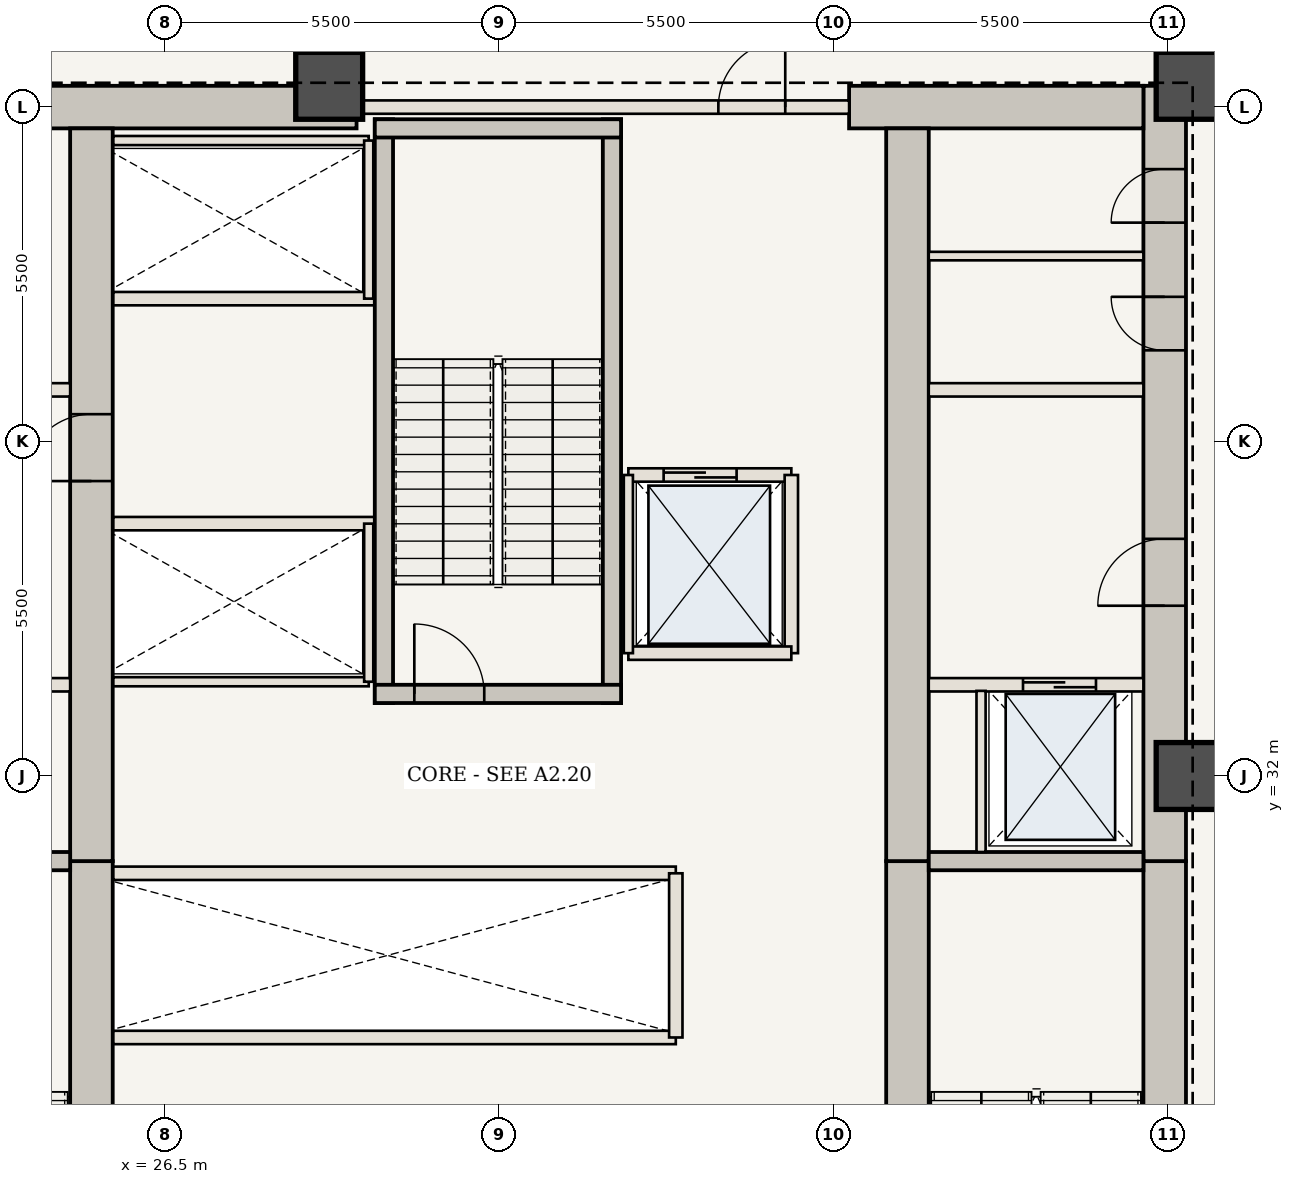
"""IFC4 building model, lengths in metres.
Left out: names, types, materials, properties, quantities, classifications, styles, units other than length and angle.
Written with IfcOpenShell. Run it as: python <this file> out.ifc"""

import sys

from ifc_helpers import new_model, si_unit, direction, frame, frame_2d, origin, origin_2d, place, context, subcontext, project, spatial, rectangle, extrude, element, fill, save


model = new_model("IFC4")
c1 = context("Model", 3, precision=1e-05, world=origin(), true_north=direction((0.0, 1.0)))
c2 = subcontext(c1, "Body", "Model", "MODEL_VIEW")
j1 = project(units=[si_unit("LENGTHUNIT", "METRE"), si_unit("PLANEANGLEUNIT", "RADIAN")], contexts=[c1])
p1 = place(None, origin())
s1 = spatial("IfcSite", under=j1, at=p1, CompositionType="ELEMENT")
p2 = place(p1, origin())
s2 = spatial("IfcBuilding", under=s1, at=p2, CompositionType="ELEMENT")
p3 = place(p2, frame((0.0, 0.0, 77.35)))
s3 = spatial("IfcBuildingStorey", under=s2, at=p3, CompositionType="ELEMENT", Elevation=77.35)
p4 = place(p3, frame((42.94, 20.6, 0.0), z_axis=(0.0, 0.0, 1.0), x_axis=(0.0, 1.0, 0.0)))
e1 = element("IfcWall", 1, at=p4, inside=s3, PredefinedType="SHEAR", context=c2, shape_type="SweptSolid", body=[
    extrude(rectangle(XDim=10.0, YDim=0.7, at=frame_2d((5.0, 0.0))), origin(), (0.0, 0.0, 1.0), 4.9),
])
p5 = place(p4, frame((1.15, 0.0, 0.0)))
e2 = element("IfcOpeningElement", 2, at=p5, cuts=e1, PredefinedType="OPENING", context=c2, shape_type="SweptSolid", body=[
    extrude(rectangle(XDim=1.15, YDim=2.15, at=frame_2d((0.575, 1.075))), frame((0.0, 0.36, 0.0), z_axis=(0.0, -1.0, 0.0), x_axis=(1.0, 0.0, 0.0)), (0.0, 0.0, 1.0), 0.72),
])
p6 = place(p3, frame((42.94, 30.6, 0.0), z_axis=(0.0, 0.0, 1.0), x_axis=(0.0, 1.0, 0.0)))
e3 = element("IfcWall", 3, at=p6, inside=s3, PredefinedType="SHEAR", context=c2, shape_type="SweptSolid", body=[
    extrude(rectangle(XDim=12.75, YDim=0.7, at=frame_2d((6.375, 0.0))), origin(), (0.0, 0.0, 1.0), 4.9),
])
p7 = place(p6, frame((4.2, 0.0, 0.0)))
e4 = element("IfcOpeningElement", 4, at=p7, cuts=e3, PredefinedType="OPENING", context=c2, shape_type="SweptSolid", body=[
    extrude(rectangle(XDim=1.1, YDim=2.15, at=frame_2d((0.55, 1.075))), frame((0.0, 0.36, 0.0), z_axis=(0.0, -1.0, 0.0), x_axis=(1.0, 0.0, 0.0)), (0.0, 0.0, 1.0), 0.72),
])
p8 = place(p6, frame((8.4, 0.0, 0.0)))
e5 = element("IfcOpeningElement", 5, at=p8, cuts=e3, PredefinedType="OPENING", context=c2, shape_type="SweptSolid", body=[
    extrude(rectangle(XDim=0.88, YDim=2.1, at=frame_2d((0.44, 1.05))), frame((0.0, 0.36, 0.0), z_axis=(0.0, -1.0, 0.0), x_axis=(1.0, 0.0, 0.0)), (0.0, 0.0, 1.0), 0.72),
])
p9 = place(p6, frame((10.5, 0.0, 0.0)))
e6 = element("IfcOpeningElement", 6, at=p9, cuts=e3, PredefinedType="OPENING", context=c2, shape_type="SweptSolid", body=[
    extrude(rectangle(XDim=0.88, YDim=2.1, at=frame_2d((0.44, 1.05))), frame((0.0, 0.36, 0.0), z_axis=(0.0, -1.0, 0.0), x_axis=(1.0, 0.0, 0.0)), (0.0, 0.0, 1.0), 0.72),
])
p10 = place(p3, frame((21.41, 43.0, 0.0), z_axis=(0.0, 0.0, 1.0), x_axis=(1.0, 0.0, 0.0)))
e7 = element("IfcWall", 7, at=p10, inside=s3, PredefinedType="SHEAR", context=c2, shape_type="SweptSolid", body=[
    extrude(rectangle(XDim=8.24, YDim=0.7, at=frame_2d((4.12, 0.0))), origin(), (0.0, 0.0, 1.0), 4.9),
])
p11 = place(p3, frame((37.75, 43.0, 0.0), z_axis=(0.0, 0.0, 1.0), x_axis=(1.0, 0.0, 0.0)))
e8 = element("IfcWall", 8, at=p11, inside=s3, PredefinedType="SHEAR", context=c2, shape_type="SweptSolid", body=[
    extrude(rectangle(XDim=4.84, YDim=0.7, at=frame_2d((2.42, 0.0))), origin(), (0.0, 0.0, 1.0), 4.9),
])
p12 = place(p3, frame((25.29, 21.3, 0.0), z_axis=(0.0, 0.0, 1.0), x_axis=(0.0, 1.0, 0.0)))
e9 = element("IfcWall", 9, at=p12, inside=s3, PredefinedType="SHEAR", context=c2, shape_type="SweptSolid", body=[
    extrude(rectangle(XDim=9.3, YDim=0.7, at=frame_2d((4.65, 0.0))), origin(), (0.0, 0.0, 1.0), 4.9),
])
p13 = place(p3, frame((25.29, 30.6, 0.0), z_axis=(0.0, 0.0, 1.0), x_axis=(0.0, 1.0, 0.0)))
e10 = element("IfcWall", 10, at=p13, inside=s3, PredefinedType="SHEAR", context=c2, shape_type="SweptSolid", body=[
    extrude(rectangle(XDim=12.05, YDim=0.7, at=frame_2d((6.025, 0.0))), origin(), (0.0, 0.0, 1.0), 4.9),
])
p14 = place(p13, frame((6.25, 0.0, 0.0)))
e11 = element("IfcOpeningElement", 11, at=p14, cuts=e10, PredefinedType="OPENING", context=c2, shape_type="SweptSolid", body=[
    extrude(rectangle(XDim=1.1, YDim=2.15, at=frame_2d((0.55, 1.075))), frame((0.0, 0.36, 0.0), z_axis=(0.0, -1.0, 0.0), x_axis=(1.0, 0.0, 0.0)), (0.0, 0.0, 1.0), 0.72),
])
p15 = place(p3, frame((38.71, 21.3, 0.0), z_axis=(0.0, 0.0, 1.0), x_axis=(0.0, 1.0, 0.0)))
e12 = element("IfcWall", 12, at=p15, inside=s3, PredefinedType="SHEAR", context=c2, shape_type="SweptSolid", body=[
    extrude(rectangle(XDim=9.3, YDim=0.7, at=frame_2d((4.65, 0.0))), origin(), (0.0, 0.0, 1.0), 4.9),
])
p16 = place(p3, frame((38.71, 30.6, 0.0), z_axis=(0.0, 0.0, 1.0), x_axis=(0.0, 1.0, 0.0)))
e13 = element("IfcWall", 13, at=p16, inside=s3, PredefinedType="SHEAR", context=c2, shape_type="SweptSolid", body=[
    extrude(rectangle(XDim=12.05, YDim=0.7, at=frame_2d((6.025, 0.0))), origin(), (0.0, 0.0, 1.0), 4.9),
])
for number, where, z_axis, x_axis in (
    (14, (43.35, 32.0, 0.0), (0.0, 0.0, 1.0), (1.0, 0.0, 0.0)),
    (15, (43.35, 43.35, 0.0), (0.0, 0.0, 1.0), (1.0, 0.0, 0.0)),
    (16, (29.2, 43.35, 0.0), (0.0, 0.0, 1.0), (1.0, 0.0, 0.0)),
):
    element("IfcColumn", number, at=place(p3, frame(where, z_axis=z_axis, x_axis=x_axis)), inside=s3, PredefinedType="COLUMN", context=c2, shape_type="SweptSolid", body=[
        extrude(rectangle(XDim=1.1, YDim=1.1, at=origin_2d()), origin(), (0.0, 0.0, 1.0), 4.9),
    ])
for number, where, z_axis, x_axis in (
    (17, (21.41, 30.6, 0.0), (0.0, 0.0, 1.0), (1.0, 0.0, 0.0)),
    (18, (39.06, 30.6, 0.0), (0.0, 0.0, 1.0), (1.0, 0.0, 0.0)),
):
    element("IfcWall", number, at=place(p3, frame(where, z_axis=z_axis, x_axis=x_axis)), inside=s3, PredefinedType="SHEAR", context=c2, shape_type="SweptSolid", body=[
        extrude(rectangle(XDim=3.53, YDim=0.3, at=frame_2d((1.765, 0.0))), origin(), (0.0, 0.0, 1.0), 4.72),
    ])
p17 = place(p3, frame((21.41, 33.5, 0.0), z_axis=(0.0, 0.0, 1.0), x_axis=(1.0, 0.0, 0.0)))
e19 = element("IfcWall", 19, at=p17, inside=s3, PredefinedType="STANDARD", context=c2, shape_type="SweptSolid", body=[
    extrude(rectangle(XDim=3.53, YDim=0.22, at=frame_2d((1.765, 0.0))), origin(), (0.0, 0.0, 1.0), 4.72),
])
p18 = place(p17, frame((0.75, 0.0, 0.0)))
e20 = element("IfcOpeningElement", 20, at=p18, cuts=e19, PredefinedType="OPENING", context=c2, shape_type="SweptSolid", body=[
    extrude(rectangle(XDim=1.2, YDim=2.2, at=frame_2d((0.6, 1.1))), frame((0.0, 0.12, 0.0), z_axis=(0.0, -1.0, 0.0), x_axis=(1.0, 0.0, 0.0)), (0.0, 0.0, 1.0), 0.24),
])
p19 = place(p3, frame((39.06, 33.5, 0.0), z_axis=(0.0, 0.0, 1.0), x_axis=(1.0, 0.0, 0.0)))
e21 = element("IfcWall", 21, at=p19, inside=s3, PredefinedType="STANDARD", context=c2, shape_type="SweptSolid", body=[
    extrude(rectangle(XDim=3.53, YDim=0.22, at=frame_2d((1.765, 0.0))), origin(), (0.0, 0.0, 1.0), 4.72),
])
p20 = place(p19, frame((1.55, 0.0, 0.0)))
e22 = element("IfcOpeningElement", 22, at=p20, cuts=e21, PredefinedType="OPENING", context=c2, shape_type="SweptSolid", body=[
    extrude(rectangle(XDim=1.2, YDim=2.2, at=frame_2d((0.6, 1.1))), frame((0.0, 0.12, 0.0), z_axis=(0.0, -1.0, 0.0), x_axis=(1.0, 0.0, 0.0)), (0.0, 0.0, 1.0), 0.24),
])
p21 = place(p3, frame((39.92, 30.75, 0.0), z_axis=(0.0, 0.0, 1.0), x_axis=(0.0, 1.0, 0.0)))
e23 = element("IfcWall", 23, at=p21, inside=s3, PredefinedType="STANDARD", context=c2, shape_type="SweptSolid", body=[
    extrude(rectangle(XDim=2.65, YDim=0.15, at=frame_2d((1.325, 0.0))), origin(), (0.0, 0.0, 1.0), 4.72),
])
for number, where, z_axis, x_axis in (
    (24, (21.41, 38.35, 0.0), (0.0, 0.0, 1.0), (1.0, 0.0, 0.0)),
    (25, (39.06, 38.35, 0.0), (0.0, 0.0, 1.0), (1.0, 0.0, 0.0)),
):
    element("IfcWall", number, at=place(p3, frame(where, z_axis=z_axis, x_axis=x_axis)), inside=s3, PredefinedType="STANDARD", context=c2, shape_type="SweptSolid", body=[
        extrude(rectangle(XDim=3.53, YDim=0.22, at=frame_2d((1.765, 0.0))), origin(), (0.0, 0.0, 1.0), 4.72),
    ])
p22 = place(p3, frame((39.06, 40.55, 0.0), z_axis=(0.0, 0.0, 1.0), x_axis=(1.0, 0.0, 0.0)))
e26 = element("IfcWall", 26, at=p22, inside=s3, PredefinedType="STANDARD", context=c2, shape_type="SweptSolid", body=[
    extrude(rectangle(XDim=3.53, YDim=0.14, at=frame_2d((1.765, 0.0))), origin(), (0.0, 0.0, 1.0), 4.72),
])
for number, where, z_axis, x_axis in (
    (27, (25.65, 27.7, 0.0), (0.0, 0.0, 1.0), (1.0, 0.0, 0.0)),
    (28, (25.65, 30.4, 0.0), (0.0, 0.0, 1.0), (1.0, 0.0, 0.0)),
):
    element("IfcWall", number, at=place(p3, frame(where, z_axis=z_axis, x_axis=x_axis)), inside=s3, PredefinedType="STANDARD", context=c2, shape_type="SweptSolid", body=[
        extrude(rectangle(XDim=9.25, YDim=0.22, at=frame_2d((4.625, 0.0))), origin(), (0.0, 0.0, 1.0), 4.72),
    ])
p23 = place(p3, frame((34.9, 27.7, 0.0), z_axis=(0.0, 0.0, 1.0), x_axis=(0.0, 1.0, 0.0)))
e29 = element("IfcWall", 29, at=p23, inside=s3, PredefinedType="STANDARD", context=c2, shape_type="SweptSolid", body=[
    extrude(rectangle(XDim=2.7, YDim=0.22, at=frame_2d((1.35, 0.0))), origin(), (0.0, 0.0, 1.0), 4.72),
])
p24 = place(p3, frame((25.65, 36.15, 0.0), z_axis=(0.0, 0.0, 1.0), x_axis=(1.0, 0.0, 0.0)))
e30 = element("IfcWall", 30, at=p24, inside=s3, PredefinedType="STANDARD", context=c2, shape_type="SweptSolid", body=[
    extrude(rectangle(XDim=4.3, YDim=0.22, at=frame_2d((2.15, 0.0))), origin(), (0.0, 0.0, 1.0), 4.72),
])
p25 = place(p3, frame((25.65, 33.55, 0.0), z_axis=(0.0, 0.0, 1.0), x_axis=(1.0, 0.0, 0.0)))
e31 = element("IfcWall", 31, at=p25, inside=s3, PredefinedType="STANDARD", context=c2, shape_type="SweptSolid", body=[
    extrude(rectangle(XDim=4.2, YDim=0.15, at=frame_2d((2.1, 0.0))), origin(), (0.0, 0.0, 1.0), 4.72),
])
p26 = place(p3, frame((29.85, 33.55, 0.0), z_axis=(0.0, 0.0, 1.0), x_axis=(0.0, 1.0, 0.0)))
e32 = element("IfcWall", 32, at=p26, inside=s3, PredefinedType="STANDARD", context=c2, shape_type="SweptSolid", body=[
    extrude(rectangle(XDim=2.6, YDim=0.15, at=frame_2d((1.3, 0.0))), origin(), (0.0, 0.0, 1.0), 4.72),
])
p27 = place(p3, frame((25.65, 39.85, 0.0), z_axis=(0.0, 0.0, 1.0), x_axis=(1.0, 0.0, 0.0)))
e33 = element("IfcWall", 33, at=p27, inside=s3, PredefinedType="STANDARD", context=c2, shape_type="SweptSolid", body=[
    extrude(rectangle(XDim=4.3, YDim=0.22, at=frame_2d((2.15, 0.0))), origin(), (0.0, 0.0, 1.0), 4.72),
])
p28 = place(p3, frame((25.65, 42.45, 0.0), z_axis=(0.0, 0.0, 1.0), x_axis=(1.0, 0.0, 0.0)))
e34 = element("IfcWall", 34, at=p28, inside=s3, PredefinedType="STANDARD", context=c2, shape_type="SweptSolid", body=[
    extrude(rectangle(XDim=4.2, YDim=0.15, at=frame_2d((2.1, 0.0))), origin(), (0.0, 0.0, 1.0), 4.72),
])
p29 = place(p3, frame((29.85, 39.85, 0.0), z_axis=(0.0, 0.0, 1.0), x_axis=(0.0, 1.0, 0.0)))
e35 = element("IfcWall", 35, at=p29, inside=s3, PredefinedType="STANDARD", context=c2, shape_type="SweptSolid", body=[
    extrude(rectangle(XDim=2.6, YDim=0.15, at=frame_2d((1.3, 0.0))), origin(), (0.0, 0.0, 1.0), 4.72),
])
for number, where, z_axis, x_axis in (
    (36, (30.1, 33.2, 0.0), (0.0, 0.0, 1.0), (0.0, 1.0, 0.0)),
    (37, (33.85, 33.2, 0.0), (0.0, 0.0, 1.0), (0.0, 1.0, 0.0)),
):
    element("IfcWall", number, at=place(p3, frame(where, z_axis=z_axis, x_axis=x_axis)), inside=s3, PredefinedType="SHEAR", context=c2, shape_type="SweptSolid", body=[
        extrude(rectangle(XDim=9.6, YDim=0.3, at=frame_2d((4.8, 0.0))), origin(), (0.0, 0.0, 1.0), 4.72),
    ])
p30 = place(p3, frame((29.95, 33.35, 0.0), z_axis=(0.0, 0.0, 1.0), x_axis=(1.0, 0.0, 0.0)))
e38 = element("IfcWall", 38, at=p30, inside=s3, PredefinedType="SHEAR", context=c2, shape_type="SweptSolid", body=[
    extrude(rectangle(XDim=4.05, YDim=0.3, at=frame_2d((2.025, 0.0))), origin(), (0.0, 0.0, 1.0), 4.72),
])
p31 = place(p30, frame((0.65, 0.0, 0.0)))
e39 = element("IfcOpeningElement", 39, at=p31, cuts=e38, PredefinedType="OPENING", context=c2, shape_type="SweptSolid", body=[
    extrude(rectangle(XDim=1.15, YDim=2.15, at=frame_2d((0.575, 1.075))), frame((0.0, 0.16, 0.0), z_axis=(0.0, -1.0, 0.0), x_axis=(1.0, 0.0, 0.0)), (0.0, 0.0, 1.0), 0.32),
])
p32 = place(p3, frame((29.95, 42.65, 0.0), z_axis=(0.0, 0.0, 1.0), x_axis=(1.0, 0.0, 0.0)))
e40 = element("IfcWall", 40, at=p32, inside=s3, PredefinedType="SHEAR", context=c2, shape_type="SweptSolid", body=[
    extrude(rectangle(XDim=4.05, YDim=0.3, at=frame_2d((2.025, 0.0))), origin(), (0.0, 0.0, 1.0), 4.72),
])
p33 = place(p3, frame((29.65, 43.0, 0.0), z_axis=(0.0, 0.0, 1.0), x_axis=(1.0, 0.0, 0.0)))
e41 = element("IfcWall", 41, at=p33, inside=s3, PredefinedType="STANDARD", context=c2, shape_type="SweptSolid", body=[
    extrude(rectangle(XDim=8.1, YDim=0.22, at=frame_2d((4.05, 0.0))), origin(), (0.0, 0.0, 1.0), 4.72),
])
p34 = place(p33, frame((5.95, 0.0, 0.0)))
e42 = element("IfcOpeningElement", 42, at=p34, cuts=e41, PredefinedType="OPENING", context=c2, shape_type="SweptSolid", body=[
    extrude(rectangle(XDim=1.1, YDim=2.15, at=frame_2d((0.55, 1.075))), frame((0.0, 0.12, 0.0), z_axis=(0.0, -1.0, 0.0), x_axis=(1.0, 0.0, 0.0)), (0.0, 0.0, 1.0), 0.24),
])
p35 = place(p3, frame((34.12, 36.95, 0.0), z_axis=(0.0, 0.0, 1.0), x_axis=(1.0, 0.0, 0.0)))
e43 = element("IfcWall", 43, at=p35, inside=s3, PredefinedType="STANDARD", context=c2, shape_type="SweptSolid", body=[
    extrude(rectangle(XDim=2.68, YDim=0.22, at=frame_2d((1.34, 0.0))), origin(), (0.0, 0.0, 1.0), 4.72),
])
p36 = place(p35, frame((0.58, 0.0, 0.0)))
e44 = element("IfcOpeningElement", 44, at=p36, cuts=e43, PredefinedType="OPENING", context=c2, shape_type="SweptSolid", body=[
    extrude(rectangle(XDim=1.2, YDim=2.2, at=frame_2d((0.6, 1.1))), frame((0.0, 0.12, 0.0), z_axis=(0.0, -1.0, 0.0), x_axis=(1.0, 0.0, 0.0)), (0.0, 0.0, 1.0), 0.24),
])
p37 = place(p3, frame((36.8, 34.02, 0.0), z_axis=(0.0, 0.0, 1.0), x_axis=(0.0, 1.0, 0.0)))
e45 = element("IfcWall", 45, at=p37, inside=s3, PredefinedType="STANDARD", context=c2, shape_type="SweptSolid", body=[
    extrude(rectangle(XDim=2.93, YDim=0.22, at=frame_2d((1.465, 0.0))), origin(), (0.0, 0.0, 1.0), 4.72),
])
p38 = place(p3, frame((34.12, 34.02, 0.0), z_axis=(0.0, 0.0, 1.0), x_axis=(1.0, 0.0, 0.0)))
e46 = element("IfcWall", 46, at=p38, inside=s3, PredefinedType="STANDARD", context=c2, shape_type="SweptSolid", body=[
    extrude(rectangle(XDim=2.68, YDim=0.22, at=frame_2d((1.34, 0.0))), origin(), (0.0, 0.0, 1.0), 4.72),
])
p39 = place(p3, frame((34.12, 34.02, 0.0), z_axis=(0.0, 0.0, 1.0), x_axis=(0.0, 1.0, 0.0)))
e47 = element("IfcWall", 47, at=p39, inside=s3, PredefinedType="STANDARD", context=c2, shape_type="SweptSolid", body=[
    extrude(rectangle(XDim=2.93, YDim=0.15, at=frame_2d((1.465, 0.0))), origin(), (0.0, 0.0, 1.0), 4.72),
])
p40 = place(p7, origin())
e48 = element("IfcDoor", 48, at=p40, inside=s3, OperationType="SINGLE_SWING_LEFT", PredefinedType="DOOR", context=c2, shape_type="SweptSolid", body=[
    extrude(rectangle(XDim=1.1, YDim=2.15, at=frame_2d((0.55, 1.075))), frame((0.0, 0.025, 0.0), z_axis=(0.0, -1.0, 0.0), x_axis=(1.0, 0.0, 0.0)), (0.0, 0.0, 1.0), 0.05),
])
fill(e4, e48)
p41 = place(p14, origin())
e49 = element("IfcDoor", 49, at=p41, inside=s3, OperationType="SINGLE_SWING_LEFT", PredefinedType="DOOR", context=c2, shape_type="SweptSolid", body=[
    extrude(rectangle(XDim=1.1, YDim=2.15, at=frame_2d((0.55, 1.075))), frame((0.0, 0.025, 0.0), z_axis=(0.0, -1.0, 0.0), x_axis=(1.0, 0.0, 0.0)), (0.0, 0.0, 1.0), 0.05),
])
fill(e11, e49)
p42 = place(p8, origin())
e50 = element("IfcDoor", 50, at=p42, inside=s3, OperationType="SINGLE_SWING_RIGHT", PredefinedType="DOOR", context=c2, shape_type="SweptSolid", body=[
    extrude(rectangle(XDim=0.88, YDim=2.1, at=frame_2d((0.44, 1.05))), frame((0.0, 0.025, 0.0), z_axis=(0.0, -1.0, 0.0), x_axis=(1.0, 0.0, 0.0)), (0.0, 0.0, 1.0), 0.05),
])
fill(e5, e50)
p43 = place(p9, origin())
e51 = element("IfcDoor", 51, at=p43, inside=s3, OperationType="SINGLE_SWING_LEFT", PredefinedType="DOOR", context=c2, shape_type="SweptSolid", body=[
    extrude(rectangle(XDim=0.88, YDim=2.1, at=frame_2d((0.44, 1.05))), frame((0.0, 0.025, 0.0), z_axis=(0.0, -1.0, 0.0), x_axis=(1.0, 0.0, 0.0)), (0.0, 0.0, 1.0), 0.05),
])
fill(e6, e51)
p44 = place(p20, origin())
e52 = element("IfcDoor", 52, at=p44, inside=s3, OperationType="DOUBLE_DOOR_SLIDING", PredefinedType="DOOR", context=c2, shape_type="SweptSolid", body=[
    extrude(rectangle(XDim=1.2, YDim=2.2, at=frame_2d((0.6, 1.1))), frame((0.0, 0.025, 0.0), z_axis=(0.0, -1.0, 0.0), x_axis=(1.0, 0.0, 0.0)), (0.0, 0.0, 1.0), 0.05),
])
fill(e22, e52)
p45 = place(p31, origin())
e53 = element("IfcDoor", 53, at=p45, inside=s3, OperationType="SINGLE_SWING_LEFT", PredefinedType="DOOR", context=c2, shape_type="SweptSolid", body=[
    extrude(rectangle(XDim=1.15, YDim=2.15, at=frame_2d((0.575, 1.075))), frame((0.0, 0.025, 0.0), z_axis=(0.0, -1.0, 0.0), x_axis=(1.0, 0.0, 0.0)), (0.0, 0.0, 1.0), 0.05),
])
fill(e39, e53)
p46 = place(p34, origin())
e54 = element("IfcDoor", 54, at=p46, inside=s3, OperationType="SINGLE_SWING_RIGHT", PredefinedType="DOOR", context=c2, shape_type="SweptSolid", body=[
    extrude(rectangle(XDim=1.1, YDim=2.15, at=frame_2d((0.55, 1.075))), frame((0.0, 0.025, 0.0), z_axis=(0.0, -1.0, 0.0), x_axis=(1.0, 0.0, 0.0)), (0.0, 0.0, 1.0), 0.05),
])
fill(e42, e54)
p47 = place(p36, origin())
e55 = element("IfcDoor", 55, at=p47, inside=s3, OperationType="DOUBLE_DOOR_SLIDING", PredefinedType="DOOR", context=c2, shape_type="SweptSolid", body=[
    extrude(rectangle(XDim=1.2, YDim=2.2, at=frame_2d((0.6, 1.1))), frame((0.0, 0.025, 0.0), z_axis=(0.0, -1.0, 0.0), x_axis=(1.0, 0.0, 0.0)), (0.0, 0.0, 1.0), 0.05),
])
fill(e44, e55)
save(model, sys.argv[1])
